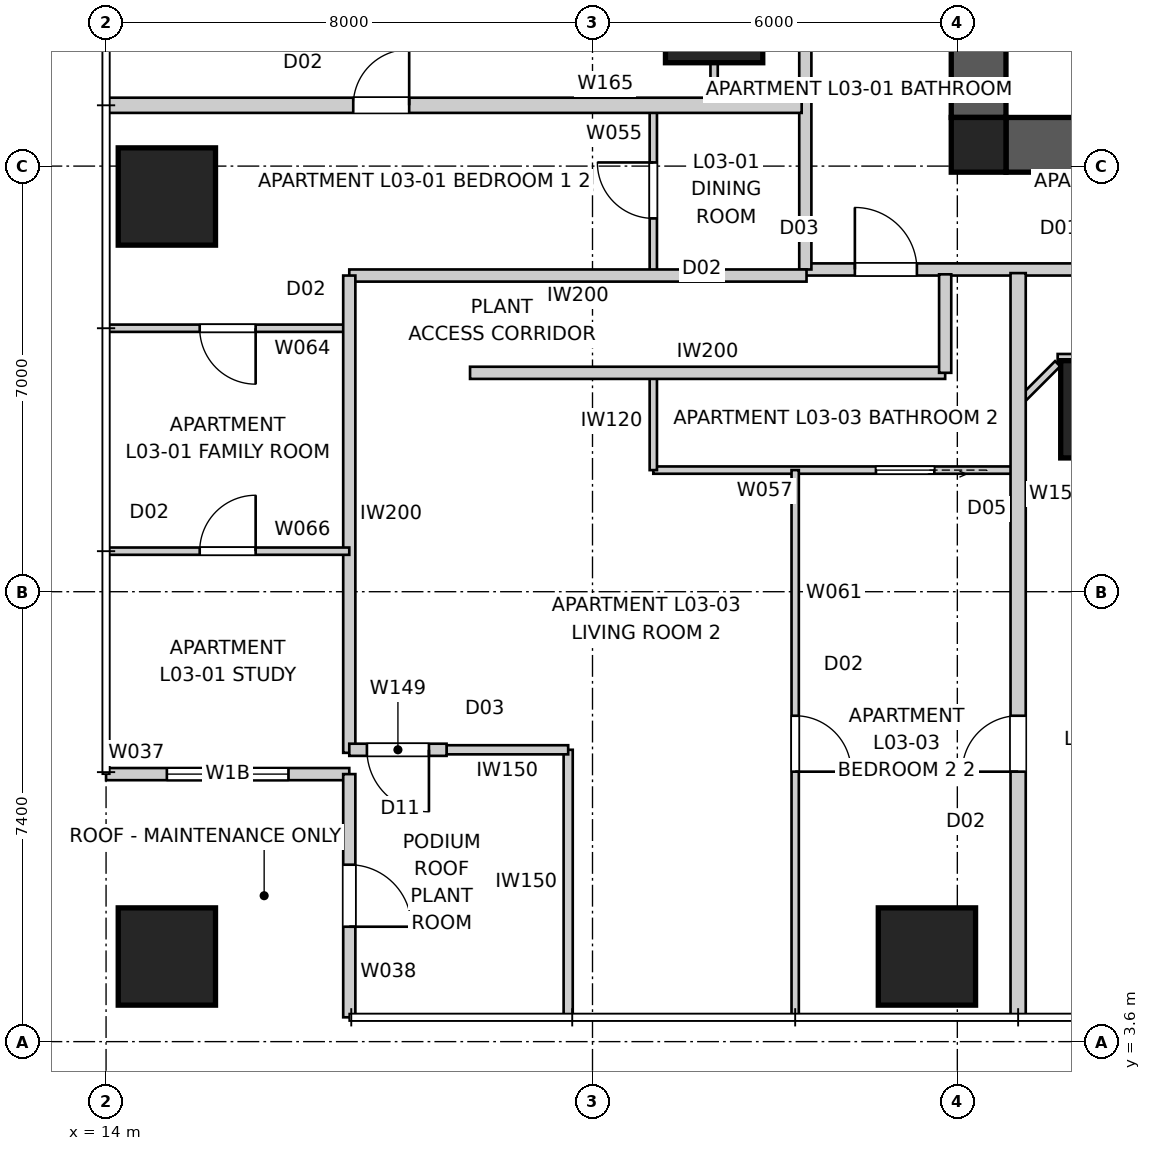
"""IFC4 building model, lengths in metres.
Left out: names, types, materials, properties, quantities, classifications, styles, units other than length and angle.
Written with IfcOpenShell. Run it as: python <this file> out.ifc"""

import sys

from ifc_helpers import new_model, si_unit, direction, frame, frame_2d, origin, origin_2d, place, context, subcontext, project, spatial, polyline, rectangle, outline, extrude, element, fill, save


model = new_model("IFC4")
c1 = context("Model", 3, precision=1e-05, world=origin(), true_north=direction((0.0, 1.0)))
c2 = subcontext(c1, "Body", "Model", "MODEL_VIEW")
j1 = project(units=[si_unit("LENGTHUNIT", "METRE"), si_unit("PLANEANGLEUNIT", "RADIAN")], contexts=[c1])
p1 = place(None, origin())
s1 = spatial("IfcSite", under=j1, at=p1, CompositionType="ELEMENT")
p2 = place(p1, origin())
s2 = spatial("IfcBuilding", under=s1, at=p2, CompositionType="ELEMENT")
p3 = place(p2, frame((0.0, 0.0, 15.0)))
s3 = spatial("IfcBuildingStorey", under=s2, at=p3, CompositionType="ELEMENT", Elevation=15.0)
p4 = place(p3, frame((51.2, 18.35, 0.0), z_axis=(0.0, 0.0, 1.0), x_axis=(-1.0, 0.0, 0.0)))
e1 = element("IfcWall", 1, at=p4, inside=s3, PredefinedType="SHEAR", context=c2, shape_type="SweptSolid", body=[
    extrude(outline(polyline([(0.0, -0.45), (22.4, -0.45), (22.4, -0.025), (22.85, -0.025), (22.85, 0.025), (22.4, 0.025), (22.4, 0.45), (0.0, 0.45), (0.0, 0.025), (-0.45, 0.025), (-0.45, -0.025), (0.0, -0.025), (0.0, -0.45)])), origin(), (0.0, 0.0, 1.0), 3.4),
])
p5 = place(p3, frame((28.35, 41.2, 0.0), z_axis=(0.0, 0.0, 1.0), x_axis=(0.0, -1.0, 0.0)))
e2 = element("IfcWall", 2, at=p5, inside=s3, PredefinedType="SHEAR", context=c2, shape_type="SweptSolid", body=[
    extrude(outline(polyline([(0.0, -0.45), (22.4, -0.45), (22.4, -0.025), (22.85, -0.025), (22.85, 0.025), (22.4, 0.025), (22.4, 0.45), (0.0, 0.45), (0.0, 0.025), (-0.45, 0.025), (-0.45, -0.025), (0.0, -0.025), (0.0, -0.45)])), origin(), (0.0, 0.0, 1.0), 3.4),
])
p6 = place(p5, frame((11.14, 0.0, 0.0)))
e3 = element("IfcOpeningElement", 3, at=p6, cuts=e2, PredefinedType="OPENING", context=c2, shape_type="SweptSolid", body=[
    extrude(rectangle(XDim=1.02, YDim=2.4, at=frame_2d((0.51, 1.2))), frame((0.0, 0.46, 0.0), z_axis=(0.0, -1.0, 0.0), x_axis=(1.0, 0.0, 0.0)), (0.0, 0.0, 1.0), 0.92),
])
p7 = place(p3, frame((28.35, 18.35, 0.0), z_axis=(0.0, 0.0, 1.0), x_axis=(1.0, 0.0, 0.0)))
e4 = element("IfcColumn", 4, at=p7, inside=s3, PredefinedType="COLUMN", context=c2, shape_type="SweptSolid", body=[
    extrude(rectangle(XDim=0.9, YDim=0.9, at=origin_2d()), origin(), (0.0, 0.0, 1.0), 3.4),
])
for number, where, z_axis, x_axis in (
    (5, (15.0, 5.0, 0.0), (0.0, 0.0, 1.0), (1.0, 0.0, 0.0)),
    (6, (27.5, 5.0, 0.0), (0.0, 0.0, 1.0), (1.0, 0.0, 0.0)),
    (7, (15.0, 17.5, 0.0), (0.0, 0.0, 1.0), (1.0, 0.0, 0.0)),
    (8, (24.0, 20.5, 0.0), (0.0, 0.0, 1.0), (1.0, 0.0, 0.0)),
    (9, (30.5, 14.0, 0.0), (0.0, 0.0, 1.0), (1.0, 0.0, 0.0)),
):
    element("IfcColumn", number, at=place(p3, frame(where, z_axis=z_axis, x_axis=x_axis)), inside=s3, PredefinedType="COLUMN", context=c2, shape_type="SweptSolid", body=[
        extrude(rectangle(XDim=1.6, YDim=1.6, at=origin_2d()), origin(), (0.0, 0.0, 1.0), 3.4),
    ])
p8 = place(p3, frame((14.0, 8.0, 0.0), z_axis=(0.0, 0.0, 1.0), x_axis=(1.0, 0.0, 0.0)))
e10 = element("IfcWall", 10, at=p8, inside=s3, PredefinedType="SOLIDWALL", context=c2, shape_type="SweptSolid", body=[
    extrude(rectangle(XDim=4.0, YDim=0.2, at=frame_2d((2.0, 0.0))), origin(), (0.0, 0.0, 1.0), 3.25),
])
p9 = place(p8, frame((1.0, 0.0, 0.45)))
e11 = element("IfcOpeningElement", 11, at=p9, cuts=e10, PredefinedType="OPENING", context=c2, shape_type="SweptSolid", body=[
    extrude(rectangle(XDim=2.0, YDim=1.8, at=frame_2d((1.0, 0.9))), frame((0.0, 0.11, 0.0), z_axis=(0.0, -1.0, 0.0), x_axis=(1.0, 0.0, 0.0)), (0.0, 0.0, 1.0), 0.22),
])
p10 = place(p3, frame((18.0, 8.0, 0.0), z_axis=(0.0, 0.0, 1.0), x_axis=(0.0, -1.0, 0.0)))
e12 = element("IfcWall", 12, at=p10, inside=s3, PredefinedType="SOLIDWALL", context=c2, shape_type="SweptSolid", body=[
    extrude(rectangle(XDim=4.0, YDim=0.2, at=frame_2d((2.0, 0.0))), origin(), (0.0, 0.0, 1.0), 3.25),
])
p11 = place(p10, frame((1.49, 0.0, 0.0)))
e13 = element("IfcOpeningElement", 13, at=p11, cuts=e12, PredefinedType="OPENING", context=c2, shape_type="SweptSolid", body=[
    extrude(rectangle(XDim=1.02, YDim=2.1, at=frame_2d((0.51, 1.05))), frame((0.0, 0.11, 0.0), z_axis=(0.0, -1.0, 0.0), x_axis=(1.0, 0.0, 0.0)), (0.0, 0.0, 1.0), 0.22),
])
p12 = place(p3, frame((25.5, 16.3, 0.0), z_axis=(0.0, 0.0, 1.0), x_axis=(1.0, 0.0, 0.0)))
e14 = element("IfcWall", 14, at=p12, inside=s3, PredefinedType="PARTITIONING", context=c2, shape_type="SweptSolid", body=[
    extrude(rectangle(XDim=29.0, YDim=0.2, at=frame_2d((14.5, 0.0))), origin(), (0.0, 0.0, 1.0), 3.25),
])
p13 = place(p12, frame((18.734, 0.0, 0.0)))
e15 = element("IfcOpeningElement", 15, at=p13, cuts=e14, PredefinedType="OPENING", context=c2, shape_type="SweptSolid", body=[
    extrude(rectangle(XDim=1.02, YDim=2.34, at=frame_2d((0.51, 1.17))), frame((0.0, 0.11, 0.0), z_axis=(0.0, -1.0, 0.0), x_axis=(1.0, 0.0, 0.0)), (0.0, 0.0, 1.0), 0.22),
])
p14 = place(p12, frame((5.096, 0.0, 0.0)))
e16 = element("IfcOpeningElement", 16, at=p14, cuts=e14, PredefinedType="OPENING", context=c2, shape_type="SweptSolid", body=[
    extrude(rectangle(XDim=1.02, YDim=2.34, at=frame_2d((0.51, 1.17))), frame((0.0, 0.11, 0.0), z_axis=(0.0, -1.0, 0.0), x_axis=(1.0, 0.0, 0.0)), (0.0, 0.0, 1.0), 0.22),
])
p15 = place(p12, frame((0.815, 0.0, 0.0)))
e17 = element("IfcOpeningElement", 17, at=p15, cuts=e14, PredefinedType="OPENING", context=c2, shape_type="SweptSolid", body=[
    extrude(rectangle(XDim=1.02, YDim=2.1, at=frame_2d((0.51, 1.05))), frame((0.0, 0.11, 0.0), z_axis=(0.0, -1.0, 0.0), x_axis=(1.0, 0.0, 0.0)), (0.0, 0.0, 1.0), 0.22),
])
p16 = place(p3, frame((25.5, 43.7, 0.0), z_axis=(0.0, 0.0, 1.0), x_axis=(0.0, -1.0, 0.0)))
e18 = element("IfcWall", 18, at=p16, inside=s3, PredefinedType="PARTITIONING", context=c2, shape_type="SweptSolid", body=[
    extrude(rectangle(XDim=27.4, YDim=0.2, at=frame_2d((13.7, 0.0))), origin(), (0.0, 0.0, 1.0), 3.25),
])
p17 = place(p16, frame((5.493, 0.0, 0.0)))
e19 = element("IfcOpeningElement", 19, at=p17, cuts=e18, PredefinedType="OPENING", context=c2, shape_type="SweptSolid", body=[
    extrude(rectangle(XDim=1.02, YDim=2.34, at=frame_2d((0.51, 1.17))), frame((0.0, 0.11, 0.0), z_axis=(0.0, -1.0, 0.0), x_axis=(1.0, 0.0, 0.0)), (0.0, 0.0, 1.0), 0.22),
])
p18 = place(p16, frame((15.16, 0.0, 0.0)))
e20 = element("IfcOpeningElement", 20, at=p18, cuts=e18, PredefinedType="OPENING", context=c2, shape_type="SweptSolid", body=[
    extrude(rectangle(XDim=1.02, YDim=2.34, at=frame_2d((0.51, 1.17))), frame((0.0, 0.11, 0.0), z_axis=(0.0, -1.0, 0.0), x_axis=(1.0, 0.0, 0.0)), (0.0, 0.0, 1.0), 0.22),
])
p19 = place(p16, frame((1.015, 0.0, 0.0)))
e21 = element("IfcOpeningElement", 21, at=p19, cuts=e18, PredefinedType="OPENING", context=c2, shape_type="SweptSolid", body=[
    extrude(rectangle(XDim=1.02, YDim=2.34, at=frame_2d((0.51, 1.17))), frame((0.0, 0.11, 0.0), z_axis=(0.0, -1.0, 0.0), x_axis=(1.0, 0.0, 0.0)), (0.0, 0.0, 1.0), 0.22),
])
p20 = place(p3, frame((29.0, 4.0, 0.0), z_axis=(0.0, 0.0, 1.0), x_axis=(0.0, 1.0, 0.0)))
e22 = element("IfcWall", 22, at=p20, inside=s3, PredefinedType="PARTITIONING", context=c2, shape_type="SweptSolid", body=[
    extrude(rectangle(XDim=12.24, YDim=0.25, at=frame_2d((6.12, 0.0))), origin(), (0.0, 0.0, 1.0), 3.25),
])
p21 = place(p20, frame((4.04, 0.0, 0.0)))
e23 = element("IfcOpeningElement", 23, at=p21, cuts=e22, PredefinedType="OPENING", context=c2, shape_type="SweptSolid", body=[
    extrude(rectangle(XDim=0.92, YDim=2.34, at=frame_2d((0.46, 1.17))), frame((0.0, 0.135, 0.0), z_axis=(0.0, -1.0, 0.0), x_axis=(1.0, 0.0, 0.0)), (0.0, 0.0, 1.0), 0.27),
])
p22 = place(p3, frame((14.0, 19.0, 0.0), z_axis=(0.0, 0.0, 1.0), x_axis=(1.0, 0.0, 0.0)))
e24 = element("IfcWall", 24, at=p22, inside=s3, PredefinedType="PARTITIONING", context=c2, shape_type="SweptSolid", body=[
    extrude(rectangle(XDim=11.44, YDim=0.25, at=frame_2d((5.72, 0.0))), origin(), (0.0, 0.0, 1.0), 3.25),
])
p23 = place(p22, frame((4.065, 0.0, 0.0)))
e25 = element("IfcOpeningElement", 25, at=p23, cuts=e24, PredefinedType="OPENING", context=c2, shape_type="SweptSolid", body=[
    extrude(rectangle(XDim=0.92, YDim=2.34, at=frame_2d((0.46, 1.17))), frame((0.0, 0.135, 0.0), z_axis=(0.0, -1.0, 0.0), x_axis=(1.0, 0.0, 0.0)), (0.0, 0.0, 1.0), 0.27),
])
p24 = place(p3, frame((24.0, 19.0, 0.0), z_axis=(0.0, 0.0, 1.0), x_axis=(0.0, 1.0, 0.0)))
e26 = element("IfcWall", 26, at=p24, inside=s3, PredefinedType="PARTITIONING", context=c2, shape_type="SweptSolid", body=[
    extrude(rectangle(XDim=3.871, YDim=0.12, at=frame_2d((1.936, 0.0))), origin(), (0.0, 0.0, 1.0), 2.549),
])
p25 = place(p3, frame((23.0, 16.2, 0.0), z_axis=(0.0, 0.0, 1.0), x_axis=(0.0, 1.0, 0.0)))
e27 = element("IfcWall", 27, at=p25, inside=s3, PredefinedType="PARTITIONING", context=c2, shape_type="SweptSolid", body=[
    extrude(rectangle(XDim=2.8, YDim=0.12, at=frame_2d((1.4, 0.0))), origin(), (0.0, 0.0, 1.0), 3.25),
])
p26 = place(p25, frame((0.94, 0.0, 0.0)))
e28 = element("IfcOpeningElement", 28, at=p26, cuts=e27, PredefinedType="OPENING", context=c2, shape_type="SweptSolid", body=[
    extrude(rectangle(XDim=0.92, YDim=2.34, at=frame_2d((0.46, 1.17))), frame((0.0, 0.07, 0.0), z_axis=(0.0, -1.0, 0.0), x_axis=(1.0, 0.0, 0.0)), (0.0, 0.0, 1.0), 0.14),
])
p27 = place(p3, frame((25.52, 16.2, 0.0), z_axis=(0.0, 0.0, 1.0), x_axis=(-1.0, 0.0, 0.0)))
e29 = element("IfcWall", 29, at=p27, inside=s3, PredefinedType="PARTITIONING", context=c2, shape_type="SweptSolid", body=[
    extrude(rectangle(XDim=7.52, YDim=0.2, at=frame_2d((3.76, 0.0))), origin(), (0.0, 0.0, 1.0), 3.25),
])
p28 = place(p3, frame((29.0, 13.0, 0.0), z_axis=(0.0, 0.0, 1.0), x_axis=(-1.0, 0.0, 0.0)))
e30 = element("IfcWall", 30, at=p28, inside=s3, PredefinedType="PARTITIONING", context=c2, shape_type="SweptSolid", body=[
    extrude(rectangle(XDim=6.0, YDim=0.12, at=frame_2d((3.0, 0.0))), origin(), (0.0, 0.0, 1.0), 3.25),
])
p29 = place(p28, frame((1.378, 0.0, 0.0)))
e31 = element("IfcOpeningElement", 31, at=p29, cuts=e30, PredefinedType="OPENING", context=c2, shape_type="SweptSolid", body=[
    extrude(rectangle(XDim=0.96, YDim=2.1, at=frame_2d((0.48, 1.05))), frame((0.0, 0.07, 0.0), z_axis=(0.0, -1.0, 0.0), x_axis=(1.0, 0.0, 0.0)), (0.0, 0.0, 1.0), 0.14),
])
p30 = place(p3, frame((23.0, 13.0, 0.0), z_axis=(0.0, 0.0, 1.0), x_axis=(0.0, 1.0, 0.0)))
e32 = element("IfcWall", 32, at=p30, inside=s3, PredefinedType="PARTITIONING", context=c2, shape_type="SweptSolid", body=[
    extrude(rectangle(XDim=1.6, YDim=0.12, at=frame_2d((0.8, 0.0))), origin(), (0.0, 0.0, 1.0), 3.25),
])
p31 = place(p3, frame((19.986, 14.6, 0.0), z_axis=(0.0, 0.0, 1.0), x_axis=(1.0, 0.0, 0.0)))
e33 = element("IfcWall", 33, at=p31, inside=s3, PredefinedType="PARTITIONING", context=c2, shape_type="SweptSolid", body=[
    extrude(rectangle(XDim=7.814, YDim=0.2, at=frame_2d((3.907, 0.0))), origin(), (0.0, 0.0, 1.0), 3.25),
])
p32 = place(p3, frame((27.8, 14.6, 0.0), z_axis=(0.0, 0.0, 1.0), x_axis=(0.0, 1.0, 0.0)))
e34 = element("IfcWall", 34, at=p32, inside=s3, PredefinedType="PARTITIONING", context=c2, shape_type="SweptSolid", body=[
    extrude(rectangle(XDim=1.62, YDim=0.2, at=frame_2d((0.81, 0.0))), origin(), (0.0, 0.0, 1.0), 3.25),
])
p33 = place(p3, frame((25.333, 13.0, 0.0), z_axis=(0.0, 0.0, 1.0), x_axis=(0.0, -1.0, 0.0)))
e35 = element("IfcWall", 35, at=p33, inside=s3, PredefinedType="PARTITIONING", context=c2, shape_type="SweptSolid", body=[
    extrude(rectangle(XDim=8.96, YDim=0.12, at=frame_2d((4.48, 0.0))), origin(), (0.0, 0.0, 1.0), 2.637),
])
p34 = place(p33, frame((4.04, 0.0, 0.0)))
e36 = element("IfcOpeningElement", 36, at=p34, cuts=e35, PredefinedType="OPENING", context=c2, shape_type="SweptSolid", body=[
    extrude(rectangle(XDim=0.92, YDim=2.34, at=frame_2d((0.46, 1.17))), frame((0.0, 0.07, 0.0), z_axis=(0.0, -1.0, 0.0), x_axis=(1.0, 0.0, 0.0)), (0.0, 0.0, 1.0), 0.14),
])
p35 = place(p3, frame((21.6, 4.04, 0.0), z_axis=(0.0, 0.0, 1.0), x_axis=(0.0, 1.0, 0.0)))
e37 = element("IfcWall", 37, at=p35, inside=s3, PredefinedType="SOLIDWALL", context=c2, shape_type="SweptSolid", body=[
    extrude(rectangle(XDim=4.36, YDim=0.15, at=frame_2d((2.18, 0.0))), origin(), (0.0, 0.0, 1.0), 3.25),
])
p36 = place(p3, frame((21.6, 8.4, 0.0), z_axis=(0.0, 0.0, 1.0), x_axis=(-1.0, 0.0, 0.0)))
e38 = element("IfcWall", 38, at=p36, inside=s3, PredefinedType="SOLIDWALL", context=c2, shape_type="SweptSolid", body=[
    extrude(rectangle(XDim=2.0, YDim=0.15, at=frame_2d((1.0, 0.0))), origin(), (0.0, 0.0, 1.0), 3.25),
])
p37 = place(p3, frame((18.0, 15.333, 0.0), z_axis=(0.0, 0.0, 1.0), x_axis=(-1.0, 0.0, 0.0)))
e39 = element("IfcWall", 39, at=p37, inside=s3, PredefinedType="PARTITIONING", context=c2, shape_type="SweptSolid", body=[
    extrude(rectangle(XDim=3.96, YDim=0.12, at=frame_2d((1.98, 0.0))), origin(), (0.0, 0.0, 1.0), 2.637),
])
p38 = place(p37, frame((1.54, 0.0, 0.0)))
e40 = element("IfcOpeningElement", 40, at=p38, cuts=e39, PredefinedType="OPENING", context=c2, shape_type="SweptSolid", body=[
    extrude(rectangle(XDim=0.92, YDim=2.34, at=frame_2d((0.46, 1.17))), frame((0.0, 0.07, 0.0), z_axis=(0.0, -1.0, 0.0), x_axis=(1.0, 0.0, 0.0)), (0.0, 0.0, 1.0), 0.14),
])
p39 = place(p3, frame((18.0, 16.2, 0.0), z_axis=(0.0, 0.0, 1.0), x_axis=(0.0, -1.0, 0.0)))
e41 = element("IfcWall", 41, at=p39, inside=s3, PredefinedType="PARTITIONING", context=c2, shape_type="SweptSolid", body=[
    extrude(rectangle(XDim=7.85, YDim=0.2, at=frame_2d((3.925, 0.0))), origin(), (0.0, 0.0, 1.0), 3.25),
])
p40 = place(p3, frame((14.04, 11.667, 0.0), z_axis=(0.0, 0.0, 1.0), x_axis=(1.0, 0.0, 0.0)))
e42 = element("IfcWall", 42, at=p40, inside=s3, PredefinedType="PARTITIONING", context=c2, shape_type="SweptSolid", body=[
    extrude(rectangle(XDim=3.96, YDim=0.12, at=frame_2d((1.98, 0.0))), origin(), (0.0, 0.0, 1.0), 3.25),
])
p41 = place(p40, frame((1.5, 0.0, 0.0)))
e43 = element("IfcOpeningElement", 43, at=p41, cuts=e42, PredefinedType="OPENING", context=c2, shape_type="SweptSolid", body=[
    extrude(rectangle(XDim=0.92, YDim=2.34, at=frame_2d((0.46, 1.17))), frame((0.0, 0.07, 0.0), z_axis=(0.0, -1.0, 0.0), x_axis=(1.0, 0.0, 0.0)), (0.0, 0.0, 1.0), 0.14),
])
p42 = place(p3, frame((31.35, 14.85, 0.0), z_axis=(0.0, 0.0, 1.0), x_axis=(-1.0, 0.0, 0.0)))
e44 = element("IfcWall", 44, at=p42, inside=s3, PredefinedType="PARTITIONING", context=c2, shape_type="SweptSolid", body=[
    extrude(rectangle(XDim=1.7, YDim=0.12, at=frame_2d((0.85, 0.0))), origin(), (0.0, 0.0, 1.0), 3.25),
])
p43 = place(p3, frame((29.65, 14.75, 0.0), z_axis=(0.0, 0.0, 1.0), x_axis=(-0.707106781187, -0.707106781187, 0.0)))
e45 = element("IfcWall", 45, at=p43, inside=s3, PredefinedType="PARTITIONING", context=c2, shape_type="SweptSolid", body=[
    extrude(rectangle(XDim=0.919, YDim=0.12, at=frame_2d((0.459, 0.0))), origin(), (0.0, 0.0, 1.0), 3.25),
])
p44 = place(p3, frame((19.6, 8.4, 0.0), z_axis=(0.0, 0.0, 1.0), x_axis=(-1.0, 0.0, 0.0)))
e46 = element("IfcWall", 46, at=p44, inside=s3, PredefinedType="PARTITIONING", context=c2, shape_type="SweptSolid", body=[
    extrude(rectangle(XDim=1.6, YDim=0.2, at=frame_2d((0.8, 0.0))), origin(), (0.0, 0.0, 1.0), 3.25),
])
p45 = place(p44, frame((0.29, 0.0, 0.0)))
e47 = element("IfcOpeningElement", 47, at=p45, cuts=e46, PredefinedType="OPENING", context=c2, shape_type="SweptSolid", body=[
    extrude(rectangle(XDim=1.02, YDim=2.1, at=frame_2d((0.51, 1.05))), frame((0.0, 0.11, 0.0), z_axis=(0.0, -1.0, 0.0), x_axis=(1.0, 0.0, 0.0)), (0.0, 0.0, 1.0), 0.22),
])
p46 = place(p9, origin())
e48 = element("IfcWindow", 48, at=p46, inside=s3, PartitioningType="SINGLE_PANEL", PredefinedType="WINDOW", context=c2, shape_type="SweptSolid", body=[
    extrude(rectangle(XDim=2.0, YDim=1.8, at=frame_2d((1.0, 0.9))), frame((0.0, 0.03, 0.0), z_axis=(0.0, -1.0, 0.0), x_axis=(1.0, 0.0, 0.0)), (0.0, 0.0, 1.0), 0.06),
])
fill(e11, e48)
p47 = place(p11, origin())
e49 = element("IfcDoor", 49, at=p47, inside=s3, OperationType="SINGLE_SWING_RIGHT", PredefinedType="DOOR", context=c2, shape_type="SweptSolid", body=[
    extrude(rectangle(XDim=1.02, YDim=2.1, at=frame_2d((0.51, 1.05))), frame((0.0, 0.025, 0.0), z_axis=(0.0, -1.0, 0.0), x_axis=(1.0, 0.0, 0.0)), (0.0, 0.0, 1.0), 0.05),
])
fill(e13, e49)
p48 = place(p15, origin())
e50 = element("IfcDoor", 50, at=p48, inside=s3, OperationType="SINGLE_SWING_LEFT", PredefinedType="DOOR", context=c2, shape_type="SweptSolid", body=[
    extrude(rectangle(XDim=1.02, YDim=2.1, at=frame_2d((0.51, 1.05))), frame((0.0, 0.025, 0.0), z_axis=(0.0, -1.0, 0.0), x_axis=(1.0, 0.0, 0.0)), (0.0, 0.0, 1.0), 0.05),
])
fill(e17, e50)
p49 = place(p45, origin())
e51 = element("IfcDoor", 51, at=p49, inside=s3, OperationType="SINGLE_SWING_LEFT", PredefinedType="DOOR", context=c2, shape_type="SweptSolid", body=[
    extrude(rectangle(XDim=1.02, YDim=2.1, at=frame_2d((0.51, 1.05))), frame((0.0, 0.025, 0.0), z_axis=(0.0, -1.0, 0.0), x_axis=(1.0, 0.0, 0.0)), (0.0, 0.0, 1.0), 0.05),
])
fill(e47, e51)
p50 = place(p21, origin())
e52 = element("IfcDoor", 52, at=p50, inside=s3, OperationType="SINGLE_SWING_LEFT", PredefinedType="DOOR", context=c2, shape_type="SweptSolid", body=[
    extrude(rectangle(XDim=0.92, YDim=2.34, at=frame_2d((0.46, 1.17))), frame((0.0, 0.025, 0.0), z_axis=(0.0, -1.0, 0.0), x_axis=(1.0, 0.0, 0.0)), (0.0, 0.0, 1.0), 0.05),
])
fill(e23, e52)
p51 = place(p34, origin())
e53 = element("IfcDoor", 53, at=p51, inside=s3, OperationType="SINGLE_SWING_RIGHT", PredefinedType="DOOR", context=c2, shape_type="SweptSolid", body=[
    extrude(rectangle(XDim=0.92, YDim=2.34, at=frame_2d((0.46, 1.17))), frame((0.0, 0.025, 0.0), z_axis=(0.0, -1.0, 0.0), x_axis=(1.0, 0.0, 0.0)), (0.0, 0.0, 1.0), 0.05),
])
fill(e36, e53)
p52 = place(p29, origin())
e54 = element("IfcDoor", 54, at=p52, inside=s3, OperationType="SLIDING_TO_LEFT", PredefinedType="DOOR", context=c2, shape_type="SweptSolid", body=[
    extrude(rectangle(XDim=0.96, YDim=2.1, at=frame_2d((0.48, 1.05))), frame((0.0, 0.025, 0.0), z_axis=(0.0, -1.0, 0.0), x_axis=(1.0, 0.0, 0.0)), (0.0, 0.0, 1.0), 0.05),
])
fill(e31, e54)
p53 = place(p23, origin())
e55 = element("IfcDoor", 55, at=p53, inside=s3, OperationType="SINGLE_SWING_RIGHT", PredefinedType="DOOR", context=c2, shape_type="SweptSolid", body=[
    extrude(rectangle(XDim=0.92, YDim=2.34, at=frame_2d((0.46, 1.17))), frame((0.0, 0.025, 0.0), z_axis=(0.0, -1.0, 0.0), x_axis=(1.0, 0.0, 0.0)), (0.0, 0.0, 1.0), 0.05),
])
fill(e25, e55)
p54 = place(p38, origin())
e56 = element("IfcDoor", 56, at=p54, inside=s3, OperationType="SINGLE_SWING_LEFT", PredefinedType="DOOR", context=c2, shape_type="SweptSolid", body=[
    extrude(rectangle(XDim=0.92, YDim=2.34, at=frame_2d((0.46, 1.17))), frame((0.0, 0.025, 0.0), z_axis=(0.0, -1.0, 0.0), x_axis=(1.0, 0.0, 0.0)), (0.0, 0.0, 1.0), 0.05),
])
fill(e40, e56)
p55 = place(p26, origin())
e57 = element("IfcDoor", 57, at=p55, inside=s3, OperationType="SINGLE_SWING_RIGHT", PredefinedType="DOOR", context=c2, shape_type="SweptSolid", body=[
    extrude(rectangle(XDim=0.92, YDim=2.34, at=frame_2d((0.46, 1.17))), frame((0.0, 0.025, 0.0), z_axis=(0.0, -1.0, 0.0), x_axis=(1.0, 0.0, 0.0)), (0.0, 0.0, 1.0), 0.05),
])
fill(e28, e57)
p56 = place(p41, origin())
e58 = element("IfcDoor", 58, at=p56, inside=s3, OperationType="SINGLE_SWING_RIGHT", PredefinedType="DOOR", context=c2, shape_type="SweptSolid", body=[
    extrude(rectangle(XDim=0.92, YDim=2.34, at=frame_2d((0.46, 1.17))), frame((0.0, 0.025, 0.0), z_axis=(0.0, -1.0, 0.0), x_axis=(1.0, 0.0, 0.0)), (0.0, 0.0, 1.0), 0.05),
])
fill(e43, e58)
save(model, sys.argv[1])
